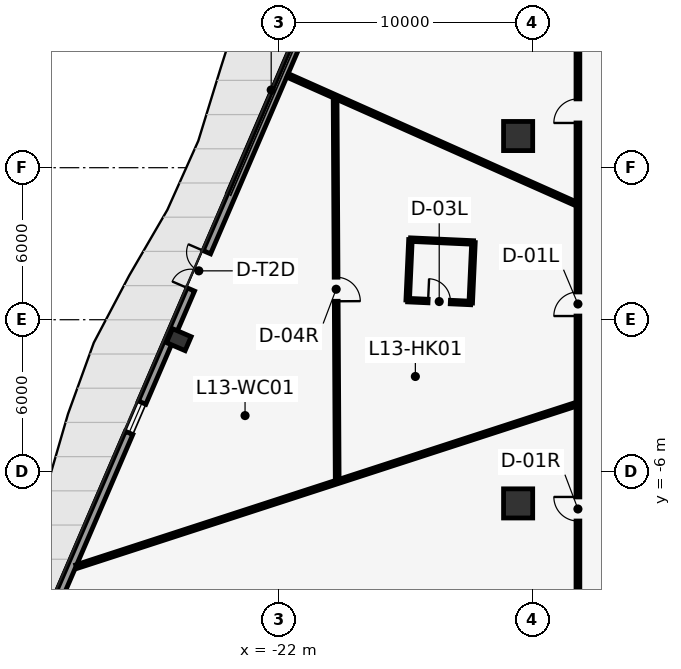
"""IFC4 building model, lengths in metres.
Left out: names, types, materials, properties, quantities, classifications, styles, units other than length and angle.
Written with IfcOpenShell. Run it as: python <this file> out.ifc"""

import sys

from ifc_helpers import new_model, si_unit, direction, frame, frame_2d, origin, origin_2d, place, context, subcontext, project, spatial, rectangle, hollow_rectangle, extrude, element, fill, save


model = new_model("IFC4")
c1 = context("Model", 3, precision=1e-05, world=origin(), true_north=direction((0.0, 1.0)))
c2 = subcontext(c1, "Body", "Model", "MODEL_VIEW")
j1 = project(units=[si_unit("LENGTHUNIT", "METRE"), si_unit("PLANEANGLEUNIT", "RADIAN")], contexts=[c1])
p1 = place(None, origin())
s1 = spatial("IfcSite", under=j1, at=p1, CompositionType="ELEMENT")
p2 = place(p1, origin())
s2 = spatial("IfcBuilding", under=s1, at=p2, CompositionType="ELEMENT")
p3 = place(p2, frame((0.0, 0.0, 62.4)))
s3 = spatial("IfcBuildingStorey", under=s2, at=p3, CompositionType="ELEMENT", Elevation=62.4)
for number, where, z_axis, x_axis in (
    (1, (-12.56, -7.25, 0.0), (0.0, 0.0, 1.0), (1.0, 0.0, 0.0)),
    (2, (-12.56, 7.25, 0.0), (0.0, 0.0, 1.0), (1.0, 0.0, 0.0)),
):
    element("IfcColumn", number, at=place(p3, frame(where, z_axis=z_axis, x_axis=x_axis)), inside=s3, PredefinedType="COLUMN", context=c2, shape_type="SweptSolid", body=[
        extrude(rectangle(XDim=1.15, YDim=1.15, at=origin_2d()), origin(), (0.0, 0.0, 1.0), 4.6),
    ])
p4 = place(p3, frame((-25.952, -0.787, 0.0), z_axis=(0.0, 0.0, 1.0), x_axis=(0.395545502563, 0.918446381343, 0.0)))
e3 = element("IfcColumn", 3, at=p4, inside=s3, PredefinedType="COLUMN", context=c2, shape_type="SweptSolid", body=[
    extrude(hollow_rectangle(XDim=0.6, YDim=0.8, WallThickness=0.05, at=origin_2d()), origin(), (0.0, 0.0, 1.0), 4.6),
])
p5 = place(p3, frame((-34.787, -20.429, 0.0), z_axis=(0.0, 0.0, 1.0), x_axis=(0.395418293843, 0.91850115563, 0.0)))
e4 = element("IfcWall", 4, at=p5, inside=s3, PredefinedType="STANDARD", context=c2, shape_type="SweptSolid", body=[
    extrude(rectangle(XDim=64.058, YDim=0.32, at=frame_2d((32.029, 0.0))), origin(), (0.0, 0.0, 1.0), 4.35),
])
p6 = place(p5, frame((23.542, 0.0, 0.0)))
e5 = element("IfcOpeningElement", 5, at=p6, cuts=e4, PredefinedType="OPENING", context=c2, shape_type="SweptSolid", body=[
    extrude(rectangle(XDim=1.6, YDim=2.2, at=frame_2d((0.8, 1.1))), frame((0.0, 0.17, 0.0), z_axis=(0.0, -1.0, 0.0), x_axis=(1.0, 0.0, 0.0)), (0.0, 0.0, 1.0), 0.34),
])
p7 = place(p5, frame((6.179, 0.0, 0.85)))
e6 = element("IfcOpeningElement", 6, at=p7, cuts=e4, PredefinedType="OPENING", context=c2, shape_type="SweptSolid", body=[
    extrude(rectangle(XDim=1.3, YDim=2.1, at=frame_2d((0.65, 1.05))), frame((0.0, 0.17, 0.0), z_axis=(0.0, -1.0, 0.0), x_axis=(1.0, 0.0, 0.0)), (0.0, 0.0, 1.0), 0.34),
])
p8 = place(p5, frame((17.379, 0.0, 0.85)))
e7 = element("IfcOpeningElement", 7, at=p8, cuts=e4, PredefinedType="OPENING", context=c2, shape_type="SweptSolid", body=[
    extrude(rectangle(XDim=1.3, YDim=2.1, at=frame_2d((0.65, 1.05))), frame((0.0, 0.17, 0.0), z_axis=(0.0, -1.0, 0.0), x_axis=(1.0, 0.0, 0.0)), (0.0, 0.0, 1.0), 0.34),
])
p9 = place(p5, frame((45.379, 0.0, 0.85)))
e8 = element("IfcOpeningElement", 8, at=p9, cuts=e4, PredefinedType="OPENING", context=c2, shape_type="SweptSolid", body=[
    extrude(rectangle(XDim=1.3, YDim=2.1, at=frame_2d((0.65, 1.05))), frame((0.0, 0.17, 0.0), z_axis=(0.0, -1.0, 0.0), x_axis=(1.0, 0.0, 0.0)), (0.0, 0.0, 1.0), 0.34),
])
p10 = place(p5, frame((50.979, 0.0, 0.85)))
e9 = element("IfcOpeningElement", 9, at=p10, cuts=e4, PredefinedType="OPENING", context=c2, shape_type="SweptSolid", body=[
    extrude(rectangle(XDim=1.3, YDim=2.1, at=frame_2d((0.65, 1.05))), frame((0.0, 0.17, 0.0), z_axis=(0.0, -1.0, 0.0), x_axis=(1.0, 0.0, 0.0)), (0.0, 0.0, 1.0), 0.34),
])
p11 = place(p5, frame((56.579, 0.0, 0.85)))
e10 = element("IfcOpeningElement", 10, at=p11, cuts=e4, PredefinedType="OPENING", context=c2, shape_type="SweptSolid", body=[
    extrude(rectangle(XDim=1.3, YDim=2.1, at=frame_2d((0.65, 1.05))), frame((0.0, 0.17, 0.0), z_axis=(0.0, -1.0, 0.0), x_axis=(1.0, 0.0, 0.0)), (0.0, 0.0, 1.0), 0.34),
])
p12 = place(p3, frame((-10.2, -11.85, 0.0), z_axis=(0.0, 0.0, 1.0), x_axis=(0.0, 1.0, 0.0)))
e11 = element("IfcWall", 11, at=p12, inside=s3, PredefinedType="PARTITIONING", context=c2, shape_type="SweptSolid", body=[
    extrude(rectangle(XDim=24.0, YDim=0.15, at=frame_2d((12.0, 0.0))), origin(), (0.0, 0.0, 1.0), 4.35),
])
p13 = place(p12, frame((11.995, 0.0, 0.0)))
e12 = element("IfcOpeningElement", 12, at=p13, cuts=e11, PredefinedType="OPENING", context=c2, shape_type="SweptSolid", body=[
    extrude(rectangle(XDim=0.95, YDim=2.15, at=frame_2d((0.475, 1.075))), frame((0.0, 0.085, 0.0), z_axis=(0.0, -1.0, 0.0), x_axis=(1.0, 0.0, 0.0)), (0.0, 0.0, 1.0), 0.17),
])
p14 = place(p12, frame((3.905, 0.0, 0.0)))
e13 = element("IfcOpeningElement", 13, at=p14, cuts=e11, PredefinedType="OPENING", context=c2, shape_type="SweptSolid", body=[
    extrude(rectangle(XDim=0.95, YDim=2.15, at=frame_2d((0.475, 1.075))), frame((0.0, 0.085, 0.0), z_axis=(0.0, -1.0, 0.0), x_axis=(1.0, 0.0, 0.0)), (0.0, 0.0, 1.0), 0.17),
])
p15 = place(p12, frame((19.615, 0.0, 0.0)))
e14 = element("IfcOpeningElement", 14, at=p15, cuts=e11, PredefinedType="OPENING", context=c2, shape_type="SweptSolid", body=[
    extrude(rectangle(XDim=0.95, YDim=2.15, at=frame_2d((0.475, 1.075))), frame((0.0, 0.085, 0.0), z_axis=(0.0, -1.0, 0.0), x_axis=(1.0, 0.0, 0.0)), (0.0, 0.0, 1.0), 0.17),
])
p16 = place(p3, frame((-10.305, 4.588, 0.0), z_axis=(0.0, 0.0, 1.0), x_axis=(-0.913551984099, 0.406721984099, 0.0)))
e15 = element("IfcWall", 15, at=p16, inside=s3, PredefinedType="PARTITIONING", context=c2, shape_type="SweptSolid", body=[
    extrude(rectangle(XDim=12.421, YDim=0.15, at=frame_2d((6.21, 0.0))), origin(), (0.0, 0.0, 1.0), 4.35),
])
p17 = place(p3, frame((-10.305, -3.348, 0.0), z_axis=(0.0, 0.0, 1.0), x_axis=(-0.951058846739, -0.309009821915, 0.0)))
e16 = element("IfcWall", 16, at=p17, inside=s3, PredefinedType="PARTITIONING", context=c2, shape_type="SweptSolid", body=[
    extrude(rectangle(XDim=20.706, YDim=0.15, at=frame_2d((10.353, 0.0))), origin(), (0.0, 0.0, 1.0), 4.35),
])
p18 = place(p3, frame((-19.784, 8.781, 0.0), z_axis=(0.0, 0.0, 1.0), x_axis=(0.005476810205, -0.999985002163, 0.0)))
e17 = element("IfcWall", 17, at=p18, inside=s3, PredefinedType="PARTITIONING", context=c2, shape_type="SweptSolid", body=[
    extrude(rectangle(XDim=15.156, YDim=0.15, at=frame_2d((7.578, 0.0))), origin(), (0.0, 0.0, 1.0), 4.35),
])
p19 = place(p18, frame((7.103, 0.0, 0.0)))
e18 = element("IfcOpeningElement", 18, at=p19, cuts=e17, PredefinedType="OPENING", context=c2, shape_type="SweptSolid", body=[
    extrude(rectangle(XDim=0.95, YDim=2.15, at=frame_2d((0.475, 1.075))), frame((0.0, 0.085, 0.0), z_axis=(0.0, -1.0, 0.0), x_axis=(1.0, 0.0, 0.0)), (0.0, 0.0, 1.0), 0.17),
])
p20 = place(p3, frame((-14.323, 3.048, 0.0), z_axis=(0.0, 0.0, 1.0), x_axis=(-0.998968944515, 0.045398765343, 0.0)))
e19 = element("IfcWall", 19, at=p20, inside=s3, PredefinedType="PARTITIONING", context=c2, shape_type="SweptSolid", body=[
    extrude(rectangle(XDim=2.49, YDim=0.14, at=frame_2d((1.245, 0.0))), origin(), (0.0, 0.0, 1.0), 4.35),
])
p21 = place(p3, frame((-16.81, 3.161, 0.0), z_axis=(0.0, 0.0, 1.0), x_axis=(-0.045356688821, -0.998970855821, 0.0)))
e20 = element("IfcWall", 20, at=p21, inside=s3, PredefinedType="PARTITIONING", context=c2, shape_type="SweptSolid", body=[
    extrude(rectangle(XDim=2.39, YDim=0.14, at=frame_2d((1.195, 0.0))), origin(), (0.0, 0.0, 1.0), 4.35),
])
p22 = place(p3, frame((-16.918, 0.774, 0.0), z_axis=(0.0, 0.0, 1.0), x_axis=(0.998968944515, -0.045398765343, 0.0)))
e21 = element("IfcWall", 21, at=p22, inside=s3, PredefinedType="PARTITIONING", context=c2, shape_type="SweptSolid", body=[
    extrude(rectangle(XDim=2.49, YDim=0.14, at=frame_2d((1.245, 0.0))), origin(), (0.0, 0.0, 1.0), 4.35),
])
p23 = place(p22, frame((0.805, 0.0, 0.0)))
e22 = element("IfcOpeningElement", 22, at=p23, cuts=e21, PredefinedType="OPENING", context=c2, shape_type="SweptSolid", body=[
    extrude(rectangle(XDim=0.88, YDim=2.1, at=frame_2d((0.44, 1.05))), frame((0.0, 0.08, 0.0), z_axis=(0.0, -1.0, 0.0), x_axis=(1.0, 0.0, 0.0)), (0.0, 0.0, 1.0), 0.16),
])
p24 = place(p3, frame((-14.431, 0.661, 0.0), z_axis=(0.0, 0.0, 1.0), x_axis=(0.045356688821, 0.998970855821, 0.0)))
e23 = element("IfcWall", 23, at=p24, inside=s3, PredefinedType="PARTITIONING", context=c2, shape_type="SweptSolid", body=[
    extrude(rectangle(XDim=2.39, YDim=0.14, at=frame_2d((1.195, 0.0))), origin(), (0.0, 0.0, 1.0), 4.35),
])
p25 = place(p6, origin())
e24 = element("IfcDoor", 24, at=p25, inside=s3, OperationType="DOUBLE_DOOR_SINGLE_SWING", PredefinedType="DOOR", context=c2, shape_type="SweptSolid", body=[
    extrude(rectangle(XDim=1.6, YDim=2.2, at=frame_2d((0.8, 1.1))), frame((0.0, 0.025, 0.0), z_axis=(0.0, -1.0, 0.0), x_axis=(1.0, 0.0, 0.0)), (0.0, 0.0, 1.0), 0.05),
])
fill(e5, e24)
p26 = place(p8, origin())
e25 = element("IfcWindow", 25, at=p26, inside=s3, PartitioningType="SINGLE_PANEL", PredefinedType="WINDOW", context=c2, shape_type="SweptSolid", body=[
    extrude(rectangle(XDim=1.3, YDim=2.1, at=frame_2d((0.65, 1.05))), frame((0.0, 0.03, 0.0), z_axis=(0.0, -1.0, 0.0), x_axis=(1.0, 0.0, 0.0)), (0.0, 0.0, 1.0), 0.06),
])
fill(e7, e25)
p27 = place(p19, origin())
e26 = element("IfcDoor", 26, at=p27, inside=s3, OperationType="SINGLE_SWING_RIGHT", PredefinedType="DOOR", context=c2, shape_type="SweptSolid", body=[
    extrude(rectangle(XDim=0.95, YDim=2.15, at=frame_2d((0.475, 1.075))), frame((0.0, 0.025, 0.0), z_axis=(0.0, -1.0, 0.0), x_axis=(1.0, 0.0, 0.0)), (0.0, 0.0, 1.0), 0.05),
])
fill(e18, e26)
p28 = place(p23, origin())
e27 = element("IfcDoor", 27, at=p28, inside=s3, OperationType="SINGLE_SWING_LEFT", PredefinedType="DOOR", context=c2, shape_type="SweptSolid", body=[
    extrude(rectangle(XDim=0.88, YDim=2.1, at=frame_2d((0.44, 1.05))), frame((0.0, 0.025, 0.0), z_axis=(0.0, -1.0, 0.0), x_axis=(1.0, 0.0, 0.0)), (0.0, 0.0, 1.0), 0.05),
])
fill(e22, e27)
p29 = place(p13, origin())
e28 = element("IfcDoor", 28, at=p29, inside=s3, OperationType="SINGLE_SWING_LEFT", PredefinedType="DOOR", context=c2, shape_type="SweptSolid", body=[
    extrude(rectangle(XDim=0.95, YDim=2.15, at=frame_2d((0.475, 1.075))), frame((0.0, 0.025, 0.0), z_axis=(0.0, -1.0, 0.0), x_axis=(1.0, 0.0, 0.0)), (0.0, 0.0, 1.0), 0.05),
])
fill(e12, e28)
p30 = place(p14, origin())
e29 = element("IfcDoor", 29, at=p30, inside=s3, OperationType="SINGLE_SWING_RIGHT", PredefinedType="DOOR", context=c2, shape_type="SweptSolid", body=[
    extrude(rectangle(XDim=0.95, YDim=2.15, at=frame_2d((0.475, 1.075))), frame((0.0, 0.025, 0.0), z_axis=(0.0, -1.0, 0.0), x_axis=(1.0, 0.0, 0.0)), (0.0, 0.0, 1.0), 0.05),
])
fill(e13, e29)
p31 = place(p15, origin())
e30 = element("IfcDoor", 30, at=p31, inside=s3, OperationType="SINGLE_SWING_LEFT", PredefinedType="DOOR", context=c2, shape_type="SweptSolid", body=[
    extrude(rectangle(XDim=0.95, YDim=2.15, at=frame_2d((0.475, 1.075))), frame((0.0, 0.025, 0.0), z_axis=(0.0, -1.0, 0.0), x_axis=(1.0, 0.0, 0.0)), (0.0, 0.0, 1.0), 0.05),
])
fill(e14, e30)
save(model, sys.argv[1])
